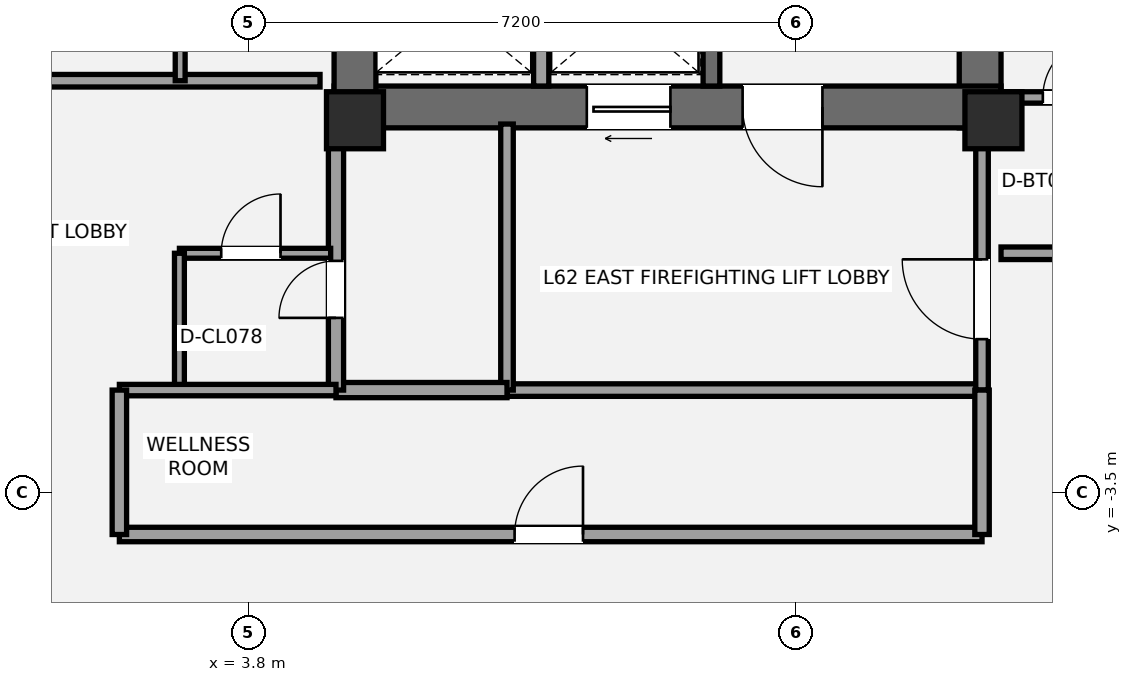
"""IFC4 building model, lengths in metres.
Left out: names, types, materials, properties, quantities, classifications, styles, units other than length and angle.
Written with IfcOpenShell. Run it as: python <this file> out.ifc"""

import sys

from ifc_helpers import new_model, si_unit, direction, frame, frame_2d, origin, origin_2d, place, context, subcontext, project, spatial, rectangle, extrude, element, fill, save


model = new_model("IFC4")
c1 = context("Model", 3, precision=1e-05, world=origin(), true_north=direction((0.0, 1.0)))
c2 = subcontext(c1, "Body", "Model", "MODEL_VIEW")
j1 = project(units=[si_unit("LENGTHUNIT", "METRE"), si_unit("PLANEANGLEUNIT", "RADIAN")], contexts=[c1])
p1 = place(None, origin())
s1 = spatial("IfcSite", under=j1, at=p1, CompositionType="ELEMENT")
p2 = place(p1, origin())
s2 = spatial("IfcBuilding", under=s1, at=p2, CompositionType="ELEMENT")
p3 = place(p2, frame((0.0, 0.0, 222.6)))
s3 = spatial("IfcBuildingStorey", under=s2, at=p3, CompositionType="ELEMENT", Elevation=222.6)
p4 = place(p3, frame((13.425, 1.3, 0.0), z_axis=(0.0, 0.0, 1.0), x_axis=(0.0, 1.0, 0.0)))
e1 = element("IfcWall", 1, at=p4, inside=s3, PredefinedType="SHEAR", context=c2, shape_type="SweptSolid", body=[
    extrude(rectangle(XDim=8.25, YDim=0.55, at=frame_2d((4.125, 0.0))), origin(), (0.0, 0.0, 1.0), 3.15),
])
p5 = place(p3, frame((13.7, 1.575, 0.0), z_axis=(0.0, 0.0, 1.0), x_axis=(-1.0, 0.0, 0.0)))
e2 = element("IfcWall", 2, at=p5, inside=s3, PredefinedType="SHEAR", context=c2, shape_type="SweptSolid", body=[
    extrude(rectangle(XDim=8.775, YDim=0.55, at=frame_2d((4.387, 0.0))), origin(), (0.0, 0.0, 1.0), 3.15),
])
p6 = place(p5, frame((2.35, 0.0, 0.0)))
e3 = element("IfcOpeningElement", 3, at=p6, cuts=e2, PredefinedType="OPENING", context=c2, shape_type="SweptSolid", body=[
    extrude(rectangle(XDim=1.05, YDim=2.15, at=frame_2d((0.525, 1.075))), frame((0.0, 0.285, 0.0), z_axis=(0.0, -1.0, 0.0), x_axis=(1.0, 0.0, 0.0)), (0.0, 0.0, 1.0), 0.57),
])
p7 = place(p5, frame((4.35, 0.0, 0.0)))
e4 = element("IfcOpeningElement", 4, at=p7, cuts=e2, PredefinedType="OPENING", context=c2, shape_type="SweptSolid", body=[
    extrude(rectangle(XDim=1.1, YDim=2.2, at=frame_2d((0.55, 1.1))), frame((0.0, 0.285, 0.0), z_axis=(0.0, -1.0, 0.0), x_axis=(1.0, 0.0, 0.0)), (0.0, 0.0, 1.0), 0.57),
])
p8 = place(p3, frame((5.2, 1.3, 0.0), z_axis=(0.0, 0.0, 1.0), x_axis=(0.0, 1.0, 0.0)))
e5 = element("IfcWall", 5, at=p8, inside=s3, PredefinedType="SHEAR", context=c2, shape_type="SweptSolid", body=[
    extrude(rectangle(XDim=2.5, YDim=0.55, at=frame_2d((1.25, 0.0))), origin(), (0.0, 0.0, 1.0), 3.15),
])
p9 = place(p3, frame((9.89, 1.85, 0.0), z_axis=(0.0, 0.0, 1.0), x_axis=(0.0, 1.0, 0.0)))
e6 = element("IfcWall", 6, at=p9, inside=s3, PredefinedType="SHEAR", context=c2, shape_type="SweptSolid", body=[
    extrude(rectangle(XDim=7.15, YDim=0.22, at=frame_2d((3.575, 0.0))), origin(), (0.0, 0.0, 1.0), 3.15),
])
for number, where, z_axis, x_axis in (
    (7, (5.2, 1.4, 0.0), (0.0, 0.0, 1.0), (1.0, 0.0, 0.0)),
    (8, (13.6, 1.4, 0.0), (0.0, 0.0, 1.0), (1.0, 0.0, 0.0)),
):
    element("IfcColumn", number, at=place(p3, frame(where, z_axis=z_axis, x_axis=x_axis)), inside=s3, PredefinedType="PILASTER", context=c2, shape_type="SweptSolid", body=[
        extrude(rectangle(XDim=0.75, YDim=0.75, at=origin_2d()), origin(), (0.0, 0.0, 1.0), 3.15),
    ])
p10 = place(p3, frame((7.2, -2.15, 0.0), z_axis=(0.0, 0.0, 1.0), x_axis=(1.0, 0.0, 0.0)))
e9 = element("IfcWall", 9, at=p10, inside=s3, PredefinedType="PARTITIONING", context=c2, shape_type="SweptSolid", body=[
    extrude(rectangle(XDim=6.25, YDim=0.165, at=frame_2d((3.125, 0.0))), origin(), (0.0, 0.0, 1.0), 2.97),
])
p11 = place(p3, frame((7.2, -2.15, 0.0), z_axis=(0.0, 0.0, 1.0), x_axis=(0.0, 1.0, 0.0)))
e10 = element("IfcWall", 10, at=p11, inside=s3, PredefinedType="PARTITIONING", context=c2, shape_type="SweptSolid", body=[
    extrude(rectangle(XDim=3.5, YDim=0.165, at=frame_2d((1.75, 0.0))), origin(), (0.0, 0.0, 1.0), 2.423),
])
p12 = place(p3, frame((13.45, -2.15, 0.0), z_axis=(0.0, 0.0, 1.0), x_axis=(0.0, 1.0, 0.0)))
e11 = element("IfcWall", 11, at=p12, inside=s3, PredefinedType="PARTITIONING", context=c2, shape_type="SweptSolid", body=[
    extrude(rectangle(XDim=3.5, YDim=0.165, at=frame_2d((1.75, 0.0))), origin(), (0.0, 0.0, 1.0), 2.423),
])
p13 = place(p12, frame((0.67, 0.0, 0.0)))
e12 = element("IfcOpeningElement", 12, at=p13, cuts=e11, PredefinedType="OPENING", context=c2, shape_type="SweptSolid", body=[
    extrude(rectangle(XDim=1.05, YDim=2.15, at=frame_2d((0.525, 1.075))), frame((0.0, 0.093, 0.0), z_axis=(0.0, -1.0, 0.0), x_axis=(1.0, 0.0, 0.0)), (0.0, 0.0, 1.0), 0.185),
])
p14 = place(p3, frame((4.95, -2.15, 0.0), z_axis=(0.0, 0.0, 1.0), x_axis=(1.0, 0.0, 0.0)))
e13 = element("IfcWall", 13, at=p14, inside=s3, PredefinedType="SOLIDWALL", context=c2, shape_type="SweptSolid", body=[
    extrude(rectangle(XDim=2.25, YDim=0.2, at=frame_2d((1.125, 0.0))), origin(), (0.0, 0.0, 1.0), 2.97),
])
p15 = place(p3, frame((4.95, -2.15, 0.0), z_axis=(0.0, 0.0, 1.0), x_axis=(0.0, 1.0, 0.0)))
e14 = element("IfcWall", 14, at=p15, inside=s3, PredefinedType="SOLIDWALL", context=c2, shape_type="SweptSolid", body=[
    extrude(rectangle(XDim=3.5, YDim=0.2, at=frame_2d((1.75, 0.0))), origin(), (0.0, 0.0, 1.0), 2.423),
])
p16 = place(p15, frame((0.95, 0.0, 0.0)))
e15 = element("IfcOpeningElement", 15, at=p16, cuts=e14, PredefinedType="OPENING", context=c2, shape_type="SweptSolid", body=[
    extrude(rectangle(XDim=0.75, YDim=2.1, at=frame_2d((0.375, 1.05))), frame((0.0, 0.11, 0.0), z_axis=(0.0, -1.0, 0.0), x_axis=(1.0, 0.0, 0.0)), (0.0, 0.0, 1.0), 0.22),
])
p17 = place(p3, frame((2.89, -0.35, 0.0), z_axis=(0.0, 0.0, 1.0), x_axis=(1.0, 0.0, 0.0)))
e16 = element("IfcWall", 16, at=p17, inside=s3, PredefinedType="PARTITIONING", context=c2, shape_type="SweptSolid", body=[
    extrude(rectangle(XDim=1.99, YDim=0.13, at=frame_2d((0.995, 0.0))), origin(), (0.0, 0.0, 1.0), 2.423),
])
p18 = place(p17, frame((0.55, 0.0, 0.0)))
e17 = element("IfcOpeningElement", 17, at=p18, cuts=e16, PredefinedType="OPENING", context=c2, shape_type="SweptSolid", body=[
    extrude(rectangle(XDim=0.78, YDim=2.1, at=frame_2d((0.39, 1.05))), frame((0.0, 0.075, 0.0), z_axis=(0.0, -1.0, 0.0), x_axis=(1.0, 0.0, 0.0)), (0.0, 0.0, 1.0), 0.15),
])
p19 = place(p3, frame((2.89, -2.15, 0.0), z_axis=(0.0, 0.0, 1.0), x_axis=(0.0, 1.0, 0.0)))
e18 = element("IfcWall", 18, at=p19, inside=s3, PredefinedType="PARTITIONING", context=c2, shape_type="SweptSolid", body=[
    extrude(rectangle(XDim=1.8, YDim=0.13, at=frame_2d((0.9, 0.0))), origin(), (0.0, 0.0, 1.0), 2.97),
])
p20 = place(p3, frame((7.65, 1.85, 0.0), z_axis=(0.0, 0.0, 1.0), x_axis=(0.0, 1.0, 0.0)))
e19 = element("IfcWall", 19, at=p20, inside=s3, PredefinedType="SOLIDWALL", context=c2, shape_type="SweptSolid", body=[
    extrude(rectangle(XDim=1.97, YDim=0.2, at=frame_2d((0.985, 0.0))), origin(), (0.0, 0.0, 1.0), 2.97),
])
p21 = place(p3, frame((0.85, 1.92, 0.0), z_axis=(0.0, 0.0, 1.0), x_axis=(1.0, 0.0, 0.0)))
e20 = element("IfcWall", 20, at=p21, inside=s3, PredefinedType="PARTITIONING", context=c2, shape_type="SweptSolid", body=[
    extrude(rectangle(XDim=3.89, YDim=0.165, at=frame_2d((1.945, 0.0))), origin(), (0.0, 0.0, 1.0), 2.11),
])
p22 = place(p3, frame((2.9, 1.92, 0.0), z_axis=(0.0, 0.0, 1.0), x_axis=(0.0, 1.0, 0.0)))
e21 = element("IfcWall", 21, at=p22, inside=s3, PredefinedType="PARTITIONING", context=c2, shape_type="SweptSolid", body=[
    extrude(rectangle(XDim=1.82, YDim=0.13, at=frame_2d((0.91, 0.0))), origin(), (0.0, 0.0, 1.0), 2.97),
])
p23 = place(p3, frame((2.1, -4.05, 0.0), z_axis=(0.0, 0.0, 1.0), x_axis=(1.0, 0.0, 0.0)))
e22 = element("IfcWall", 22, at=p23, inside=s3, PredefinedType="PLUMBINGWALL", context=c2, shape_type="SweptSolid", body=[
    extrude(rectangle(XDim=11.35, YDim=0.19, at=frame_2d((5.675, 0.0))), origin(), (0.0, 0.0, 1.0), 2.357),
])
p24 = place(p23, frame((5.2, 0.0, 0.0)))
e23 = element("IfcOpeningElement", 23, at=p24, cuts=e22, PredefinedType="OPENING", context=c2, shape_type="SweptSolid", body=[
    extrude(rectangle(XDim=0.9, YDim=2.1, at=frame_2d((0.45, 1.05))), frame((0.0, 0.105, 0.0), z_axis=(0.0, -1.0, 0.0), x_axis=(1.0, 0.0, 0.0)), (0.0, 0.0, 1.0), 0.21),
])
p25 = place(p3, frame((2.1, -2.15, 0.0), z_axis=(0.0, 0.0, 1.0), x_axis=(1.0, 0.0, 0.0)))
e24 = element("IfcWall", 24, at=p25, inside=s3, PredefinedType="PLUMBINGWALL", context=c2, shape_type="SweptSolid", body=[
    extrude(rectangle(XDim=2.85, YDim=0.15, at=frame_2d((1.425, 0.0))), origin(), (0.0, 0.0, 1.0), 2.97),
])
p26 = place(p3, frame((2.1, -4.05, 0.0), z_axis=(0.0, 0.0, 1.0), x_axis=(0.0, 1.0, 0.0)))
e25 = element("IfcWall", 25, at=p26, inside=s3, PredefinedType="PLUMBINGWALL", context=c2, shape_type="SweptSolid", body=[
    extrude(rectangle(XDim=1.9, YDim=0.19, at=frame_2d((0.95, 0.0))), origin(), (0.0, 0.0, 1.0), 2.97),
])
p27 = place(p3, frame((13.45, -4.05, 0.0), z_axis=(0.0, 0.0, 1.0), x_axis=(0.0, 1.0, 0.0)))
e26 = element("IfcWall", 26, at=p27, inside=s3, PredefinedType="PLUMBINGWALL", context=c2, shape_type="SweptSolid", body=[
    extrude(rectangle(XDim=1.9, YDim=0.19, at=frame_2d((0.95, 0.0))), origin(), (0.0, 0.0, 1.0), 2.423),
])
p28 = place(p3, frame((13.7, -0.35, 0.0), z_axis=(0.0, 0.0, 1.0), x_axis=(1.0, 0.0, 0.0)))
e27 = element("IfcWall", 27, at=p28, inside=s3, PredefinedType="PARTITIONING", context=c2, shape_type="SweptSolid", body=[
    extrude(rectangle(XDim=1.85, YDim=0.165, at=frame_2d((0.925, 0.0))), origin(), (0.0, 0.0, 1.0), 2.423),
])
p29 = place(p3, frame((13.7, 1.7, 0.0), z_axis=(0.0, 0.0, 1.0), x_axis=(1.0, 0.0, 0.0)))
e28 = element("IfcWall", 28, at=p29, inside=s3, PredefinedType="PLUMBINGWALL", context=c2, shape_type="SweptSolid", body=[
    extrude(rectangle(XDim=4.25, YDim=0.15, at=frame_2d((2.125, 0.0))), origin(), (0.0, 0.0, 1.0), 2.423),
])
p30 = place(p29, frame((0.55, 0.0, 0.0)))
e29 = element("IfcOpeningElement", 29, at=p30, cuts=e28, PredefinedType="OPENING", context=c2, shape_type="SweptSolid", body=[
    extrude(rectangle(XDim=0.8, YDim=2.1, at=frame_2d((0.4, 1.05))), frame((0.0, 0.085, 0.0), z_axis=(0.0, -1.0, 0.0), x_axis=(1.0, 0.0, 0.0)), (0.0, 0.0, 1.0), 0.17),
])
p31 = place(p29, frame((2.15, 0.0, 0.0)))
e30 = element("IfcOpeningElement", 30, at=p31, cuts=e28, PredefinedType="OPENING", context=c2, shape_type="SweptSolid", body=[
    extrude(rectangle(XDim=0.85, YDim=2.1, at=frame_2d((0.425, 1.05))), frame((0.0, 0.085, 0.0), z_axis=(0.0, -1.0, 0.0), x_axis=(1.0, 0.0, 0.0)), (0.0, 0.0, 1.0), 0.17),
])
p32 = place(p6, origin())
e31 = element("IfcDoor", 31, at=p32, inside=s3, OperationType="SINGLE_SWING_LEFT", PredefinedType="DOOR", context=c2, shape_type="SweptSolid", body=[
    extrude(rectangle(XDim=1.05, YDim=2.15, at=frame_2d((0.525, 1.075))), frame((0.0, 0.025, 0.0), z_axis=(0.0, -1.0, 0.0), x_axis=(1.0, 0.0, 0.0)), (0.0, 0.0, 1.0), 0.05),
])
fill(e3, e31)
p33 = place(p13, origin())
e32 = element("IfcDoor", 32, at=p33, inside=s3, OperationType="SINGLE_SWING_RIGHT", PredefinedType="DOOR", context=c2, shape_type="SweptSolid", body=[
    extrude(rectangle(XDim=1.05, YDim=2.15, at=frame_2d((0.525, 1.075))), frame((0.0, 0.025, 0.0), z_axis=(0.0, -1.0, 0.0), x_axis=(1.0, 0.0, 0.0)), (0.0, 0.0, 1.0), 0.05),
])
fill(e12, e32)
p34 = place(p16, origin())
e33 = element("IfcDoor", 33, at=p34, inside=s3, OperationType="SINGLE_SWING_LEFT", PredefinedType="DOOR", context=c2, shape_type="SweptSolid", body=[
    extrude(rectangle(XDim=0.75, YDim=2.1, at=frame_2d((0.375, 1.05))), frame((0.0, 0.025, 0.0), z_axis=(0.0, -1.0, 0.0), x_axis=(1.0, 0.0, 0.0)), (0.0, 0.0, 1.0), 0.05),
])
fill(e15, e33)
p35 = place(p18, origin())
e34 = element("IfcDoor", 34, at=p35, inside=s3, OperationType="SINGLE_SWING_RIGHT", PredefinedType="DOOR", context=c2, shape_type="SweptSolid", body=[
    extrude(rectangle(XDim=0.78, YDim=2.1, at=frame_2d((0.39, 1.05))), frame((0.0, 0.025, 0.0), z_axis=(0.0, -1.0, 0.0), x_axis=(1.0, 0.0, 0.0)), (0.0, 0.0, 1.0), 0.05),
])
fill(e17, e34)
p36 = place(p7, origin())
e35 = element("IfcDoor", 35, at=p36, inside=s3, OperationType="SLIDING_TO_LEFT", PredefinedType="DOOR", context=c2, shape_type="SweptSolid", body=[
    extrude(rectangle(XDim=1.1, YDim=2.2, at=frame_2d((0.55, 1.1))), frame((0.0, 0.025, 0.0), z_axis=(0.0, -1.0, 0.0), x_axis=(1.0, 0.0, 0.0)), (0.0, 0.0, 1.0), 0.05),
])
fill(e4, e35)
p37 = place(p24, origin())
e36 = element("IfcDoor", 36, at=p37, inside=s3, OperationType="SINGLE_SWING_RIGHT", PredefinedType="DOOR", context=c2, shape_type="SweptSolid", body=[
    extrude(rectangle(XDim=0.9, YDim=2.1, at=frame_2d((0.45, 1.05))), frame((0.0, 0.025, 0.0), z_axis=(0.0, -1.0, 0.0), x_axis=(1.0, 0.0, 0.0)), (0.0, 0.0, 1.0), 0.05),
])
fill(e23, e36)
p38 = place(p30, origin())
e37 = element("IfcDoor", 37, at=p38, inside=s3, OperationType="SINGLE_SWING_RIGHT", PredefinedType="DOOR", context=c2, shape_type="SweptSolid", body=[
    extrude(rectangle(XDim=0.8, YDim=2.1, at=frame_2d((0.4, 1.05))), frame((0.0, 0.025, 0.0), z_axis=(0.0, -1.0, 0.0), x_axis=(1.0, 0.0, 0.0)), (0.0, 0.0, 1.0), 0.05),
])
fill(e29, e37)
save(model, sys.argv[1])
